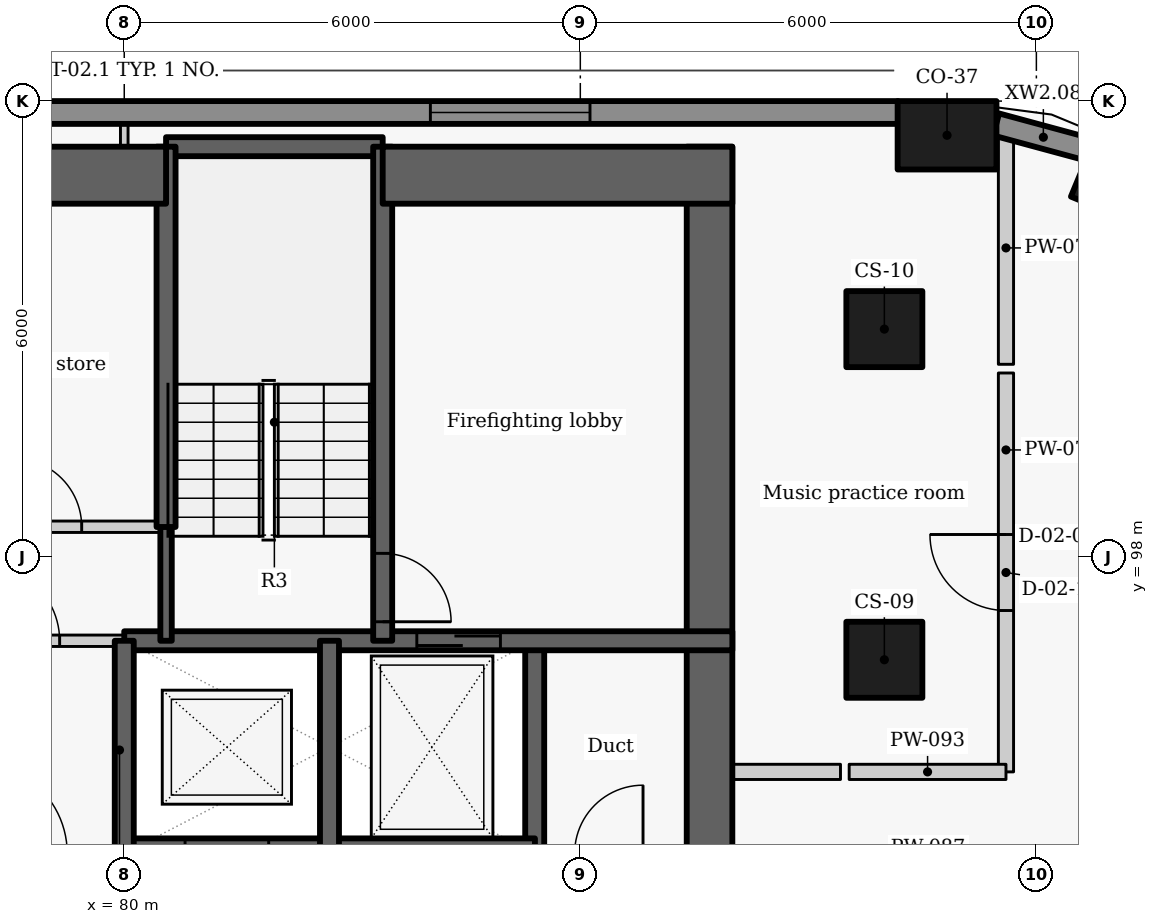
"""IFC4 building model, lengths in metres.
Left out: names, types, materials, properties, quantities, classifications, styles, units other than length and angle.
Written with IfcOpenShell. Run it as: python <this file> out.ifc"""

import sys

from ifc_helpers import new_model, si_unit, direction, frame, frame_2d, origin, origin_2d, place, context, subcontext, project, spatial, rectangle, extrude, element, fill, save


model = new_model("IFC4")
c1 = context("Model", 3, precision=1e-05, world=origin(), true_north=direction((0.0, 1.0)))
c2 = subcontext(c1, "Body", "Model", "MODEL_VIEW")
j1 = project(units=[si_unit("LENGTHUNIT", "METRE"), si_unit("PLANEANGLEUNIT", "RADIAN")], contexts=[c1])
p1 = place(None, origin())
s1 = spatial("IfcSite", under=j1, at=p1, CompositionType="ELEMENT")
p2 = place(p1, origin())
s2 = spatial("IfcBuilding", under=s1, at=p2, CompositionType="ELEMENT")
p3 = place(p2, frame((0.0, 0.0, 130.5)))
s3 = spatial("IfcBuildingStorey", under=s2, at=p3, CompositionType="ELEMENT", Elevation=130.5)
for number, where, z_axis, x_axis in (
    (1, (93.227, 102.91, 0.0), (0.0, 0.0, 1.0), (-0.924, 0.383, 0.0)),
    (2, (90.825, 103.55, 0.0), (0.0, 0.0, 1.0), (-1.0, 0.0, 0.0)),
):
    element("IfcColumn", number, at=place(p3, frame(where, z_axis=z_axis, x_axis=x_axis)), inside=s3, PredefinedType="COLUMN", context=c2, shape_type="SweptSolid", body=[
        extrude(rectangle(XDim=1.3, YDim=0.9, at=origin_2d()), origin(), (0.0, 0.0, 1.0), 3.3),
    ])
for number, where, z_axis, x_axis in (
    (3, (90.0, 96.65, 0.0), (0.0, 0.0, 1.0), (0.0, 1.0, 0.0)),
    (4, (90.0, 101.0, 0.0), (0.0, 0.0, 1.0), (0.0, 1.0, 0.0)),
):
    element("IfcColumn", number, at=place(p3, frame(where, z_axis=z_axis, x_axis=x_axis)), inside=s3, PredefinedType="COLUMN", context=c2, shape_type="SweptSolid", body=[
        extrude(rectangle(XDim=1.0, YDim=1.0, at=origin_2d()), origin(), (0.0, 0.0, 1.0), 3.3),
    ])
p4 = place(p3, frame((92.713, 103.356, 0.0), z_axis=(0.0, 0.0, 1.0), x_axis=(-0.965274225809, 0.26123872031, 0.0)))
e5 = element("IfcWall", 5, at=p4, inside=s3, PredefinedType="SOLIDWALL", context=c2, shape_type="SweptSolid", body=[
    extrude(rectangle(XDim=1.287, YDim=0.3, at=frame_2d((0.644, 0.0))), origin(), (0.0, 0.0, 1.0), 2.425),
])
p5 = place(p3, frame((90.179, 103.85, 0.0), z_axis=(0.0, 0.0, 1.0), x_axis=(-1.0, 0.0, 0.0)))
e6 = element("IfcWall", 6, at=p5, inside=s3, PredefinedType="SOLIDWALL", context=c2, shape_type="SweptSolid", body=[
    extrude(rectangle(XDim=20.391, YDim=0.3, at=frame_2d((10.196, 0.0))), origin(), (0.0, 0.0, 1.0), 2.425),
])
p6 = place(p5, frame((4.051, 0.0, 0.9)))
e7 = element("IfcOpeningElement", 7, at=p6, cuts=e6, PredefinedType="OPENING", context=c2, shape_type="SweptSolid", body=[
    extrude(rectangle(XDim=2.1, YDim=1.1, at=frame_2d((1.05, 0.55))), frame((0.0, 0.16, 0.0), z_axis=(0.0, -1.0, 0.0), x_axis=(1.0, 0.0, 0.0)), (0.0, 0.0, 1.0), 0.32),
])
p7 = place(p5, frame((14.212, 0.0, 0.9)))
e8 = element("IfcOpeningElement", 8, at=p7, cuts=e6, PredefinedType="OPENING", context=c2, shape_type="SweptSolid", body=[
    extrude(rectangle(XDim=2.1, YDim=1.1, at=frame_2d((1.05, 0.55))), frame((0.0, 0.16, 0.0), z_axis=(0.0, -1.0, 0.0), x_axis=(1.0, 0.0, 0.0)), (0.0, 0.0, 1.0), 0.32),
])
p8 = place(p3, frame((85.4, 94.1, -0.275), z_axis=(0.0, 0.0, 1.0), x_axis=(0.0, 1.0, 0.0)))
e9 = element("IfcWall", 9, at=p8, inside=s3, PredefinedType="SHEAR", context=c2, shape_type="SweptSolid", body=[
    extrude(rectangle(XDim=2.8, YDim=0.25, at=frame_2d((1.4, 0.0))), origin(), (0.0, 0.0, 1.0), 3.3),
])
p9 = place(p3, frame((87.7, 103.4, -0.275), z_axis=(0.0, 0.0, 1.0), x_axis=(0.0, -1.0, 0.0)))
e10 = element("IfcWall", 10, at=p9, inside=s3, PredefinedType="SHEAR", context=c2, shape_type="SweptSolid", body=[
    extrude(rectangle(XDim=15.6, YDim=0.6, at=frame_2d((7.8, 0.0))), origin(), (0.0, 0.0, 1.0), 3.3),
])
p10 = place(p9, frame((10.248, 0.0, 0.275)))
e11 = element("IfcOpeningElement", 11, at=p10, cuts=e10, PredefinedType="OPENING", context=c2, shape_type="SweptSolid", body=[
    extrude(rectangle(XDim=1.5, YDim=2.1, at=frame_2d((0.75, 1.05))), frame((0.0, 0.31, 0.0), z_axis=(0.0, -1.0, 0.0), x_axis=(1.0, 0.0, 0.0)), (0.0, 0.0, 1.0), 0.62),
])
p11 = place(p3, frame((79.997, 94.1, -0.275), z_axis=(0.0, 0.0, 1.0), x_axis=(1.0, 0.0, 0.0)))
e12 = element("IfcWall", 12, at=p11, inside=s3, PredefinedType="SHEAR", context=c2, shape_type="SweptSolid", body=[
    extrude(rectangle(XDim=5.406, YDim=0.4, at=frame_2d((2.703, 0.0))), origin(), (0.0, 0.0, 1.0), 3.3),
])
p12 = place(p11, frame((0.803, 0.0, 0.275)))
e13 = element("IfcOpeningElement", 13, at=p12, cuts=e12, PredefinedType="OPENING", context=c2, shape_type="SweptSolid", body=[
    extrude(rectangle(XDim=1.1, YDim=2.1, at=frame_2d((0.55, 1.05))), frame((0.0, 0.21, 0.0), z_axis=(0.0, -1.0, 0.0), x_axis=(1.0, 0.0, 0.0)), (0.0, 0.0, 1.0), 0.42),
])
p13 = place(p3, frame((80.0, 96.9, -0.275), z_axis=(0.0, 0.0, 1.0), x_axis=(1.0, 0.0, 0.0)))
e14 = element("IfcWall", 14, at=p13, inside=s3, PredefinedType="SHEAR", context=c2, shape_type="SweptSolid", body=[
    extrude(rectangle(XDim=8.0, YDim=0.25, at=frame_2d((4.0, 0.0))), origin(), (0.0, 0.0, 1.0), 3.3),
])
p14 = place(p13, frame((3.849, 0.0, 0.275)))
e15 = element("IfcOpeningElement", 15, at=p14, cuts=e14, PredefinedType="OPENING", context=c2, shape_type="SweptSolid", body=[
    extrude(rectangle(XDim=1.1, YDim=2.1, at=frame_2d((0.55, 1.05))), frame((0.0, 0.135, 0.0), z_axis=(0.0, -1.0, 0.0), x_axis=(1.0, 0.0, 0.0)), (0.0, 0.0, 1.0), 0.27),
])
p15 = place(p3, frame((80.0, 94.1, -0.275), z_axis=(0.0, 0.0, 1.0), x_axis=(0.0, 1.0, 0.0)))
e16 = element("IfcWall", 16, at=p15, inside=s3, PredefinedType="SHEAR", context=c2, shape_type="SweptSolid", body=[
    extrude(rectangle(XDim=2.8, YDim=0.25, at=frame_2d((1.4, 0.0))), origin(), (0.0, 0.0, 1.0), 3.3),
])
p16 = place(p3, frame((77.3, 96.9, 0.0), z_axis=(0.0, 0.0, 1.0), x_axis=(1.0, 0.0, 0.0)))
e17 = element("IfcWall", 17, at=p16, inside=s3, PredefinedType="PARTITIONING", context=c2, shape_type="SweptSolid", body=[
    extrude(rectangle(XDim=2.7, YDim=0.15, at=frame_2d((1.35, 0.0))), origin(), (0.0, 0.0, 1.0), 3.025),
])
p17 = place(p16, frame((0.85, 0.0, 0.0)))
e18 = element("IfcOpeningElement", 18, at=p17, cuts=e17, PredefinedType="OPENING", context=c2, shape_type="SweptSolid", body=[
    extrude(rectangle(XDim=1.0, YDim=2.1, at=frame_2d((0.5, 1.05))), frame((0.0, 0.085, 0.0), z_axis=(0.0, -1.0, 0.0), x_axis=(1.0, 0.0, 0.0)), (0.0, 0.0, 1.0), 0.17),
])
p18 = place(p3, frame((82.7, 94.1, -0.275), z_axis=(0.0, 0.0, 1.0), x_axis=(0.0, 1.0, 0.0)))
e19 = element("IfcWall", 19, at=p18, inside=s3, PredefinedType="SHEAR", context=c2, shape_type="SweptSolid", body=[
    extrude(rectangle(XDim=2.8, YDim=0.25, at=frame_2d((1.4, 0.0))), origin(), (0.0, 0.0, 1.0), 3.3),
])
p19 = place(p3, frame((80.55, 103.4, -0.275), z_axis=(0.0, 0.0, 1.0), x_axis=(1.0, 0.0, 0.0)))
e20 = element("IfcWall", 20, at=p19, inside=s3, PredefinedType="SHEAR", context=c2, shape_type="SweptSolid", body=[
    extrude(rectangle(XDim=2.85, YDim=0.25, at=frame_2d((1.425, 0.0))), origin(), (0.0, 0.0, 1.0), 3.3),
])
p20 = place(p3, frame((83.4, 103.4, -0.275), z_axis=(0.0, 0.0, 1.0), x_axis=(0.0, -1.0, 0.0)))
e21 = element("IfcWall", 21, at=p20, inside=s3, PredefinedType="SHEAR", context=c2, shape_type="SweptSolid", body=[
    extrude(rectangle(XDim=6.5, YDim=0.25, at=frame_2d((3.25, 0.0))), origin(), (0.0, 0.0, 1.0), 3.3),
])
p21 = place(p20, frame((5.35, 0.0, 0.275)))
e22 = element("IfcOpeningElement", 22, at=p21, cuts=e21, PredefinedType="OPENING", context=c2, shape_type="SweptSolid", body=[
    extrude(rectangle(XDim=0.9, YDim=2.1, at=frame_2d((0.45, 1.05))), frame((0.0, 0.135, 0.0), z_axis=(0.0, -1.0, 0.0), x_axis=(1.0, 0.0, 0.0)), (0.0, 0.0, 1.0), 0.27),
])
p22 = place(p3, frame((80.55, 96.9, -0.275), z_axis=(0.0, 0.0, 1.0), x_axis=(0.0, 1.0, 0.0)))
e23 = element("IfcWall", 23, at=p22, inside=s3, PredefinedType="SHEAR", context=c2, shape_type="SweptSolid", body=[
    extrude(rectangle(XDim=1.503, YDim=0.15, at=frame_2d((0.751, 0.0))), origin(), (0.0, 0.0, 1.0), 3.3),
])
p23 = place(p3, frame((80.55, 98.397, -0.275), z_axis=(0.0, 0.0, 1.0), x_axis=(0.0, 1.0, 0.0)))
e24 = element("IfcWall", 24, at=p23, inside=s3, PredefinedType="SHEAR", context=c2, shape_type="SweptSolid", body=[
    extrude(rectangle(XDim=5.003, YDim=0.25, at=frame_2d((2.501, 0.0))), origin(), (0.0, 0.0, 1.0), 3.3),
])
p24 = place(p3, frame((75.35, 103.025, -0.275), z_axis=(0.0, 0.0, 1.0), x_axis=(1.0, 0.0, 0.0)))
e25 = element("IfcWall", 25, at=p24, inside=s3, PredefinedType="SHEAR", context=c2, shape_type="SweptSolid", body=[
    extrude(rectangle(XDim=5.2, YDim=0.75, at=frame_2d((2.6, 0.0))), origin(), (0.0, 0.0, 1.0), 3.3),
])
p25 = place(p3, frame((83.4, 103.025, -0.275), z_axis=(0.0, 0.0, 1.0), x_axis=(1.0, 0.0, 0.0)))
e26 = element("IfcWall", 26, at=p25, inside=s3, PredefinedType="SHEAR", context=c2, shape_type="SweptSolid", body=[
    extrude(rectangle(XDim=4.6, YDim=0.75, at=frame_2d((2.3, 0.0))), origin(), (0.0, 0.0, 1.0), 3.3),
])
p26 = place(p3, frame((75.35, 98.4, 0.0), z_axis=(0.0, 0.0, 1.0), x_axis=(1.0, 0.0, 0.0)))
e27 = element("IfcWall", 27, at=p26, inside=s3, PredefinedType="PARTITIONING", context=c2, shape_type="SweptSolid", body=[
    extrude(rectangle(XDim=5.2, YDim=0.15, at=frame_2d((2.6, 0.0))), origin(), (0.0, 0.0, 1.0), 3.025),
])
p27 = place(p26, frame((0.59, 0.0, 0.0)))
e28 = element("IfcOpeningElement", 28, at=p27, cuts=e27, PredefinedType="OPENING", context=c2, shape_type="SweptSolid", body=[
    extrude(rectangle(XDim=0.9, YDim=2.1, at=frame_2d((0.45, 1.05))), frame((0.0, 0.085, 0.0), z_axis=(0.0, -1.0, 0.0), x_axis=(1.0, 0.0, 0.0)), (0.0, 0.0, 1.0), 0.17),
])
p28 = place(p26, frame((3.19, 0.0, 0.0)))
e29 = element("IfcOpeningElement", 29, at=p28, cuts=e27, PredefinedType="OPENING", context=c2, shape_type="SweptSolid", body=[
    extrude(rectangle(XDim=0.9, YDim=2.1, at=frame_2d((0.45, 1.05))), frame((0.0, 0.085, 0.0), z_axis=(0.0, -1.0, 0.0), x_axis=(1.0, 0.0, 0.0)), (0.0, 0.0, 1.0), 0.17),
])
p29 = place(p3, frame((91.6, 95.175, 0.0), z_axis=(0.0, 0.0, 1.0), x_axis=(0.0, 1.0, 0.0)))
e30 = element("IfcWall", 30, at=p29, inside=s3, PredefinedType="PARTITIONING", context=c2, shape_type="SweptSolid", body=[
    extrude(rectangle(XDim=5.248, YDim=0.2, at=frame_2d((2.624, 0.0))), origin(), (0.0, 0.0, 1.0), 3.025),
])
p30 = place(p29, frame((2.123, 0.0, 0.0)))
e31 = element("IfcOpeningElement", 31, at=p30, cuts=e30, PredefinedType="OPENING", context=c2, shape_type="SweptSolid", body=[
    extrude(rectangle(XDim=1.0, YDim=2.1, at=frame_2d((0.5, 1.05))), frame((0.0, 0.11, 0.0), z_axis=(0.0, -1.0, 0.0), x_axis=(1.0, 0.0, 0.0)), (0.0, 0.0, 1.0), 0.22),
])
p31 = place(p3, frame((91.6, 100.537, 0.0), z_axis=(0.0, 0.0, 1.0), x_axis=(0.0, 1.0, 0.0)))
e32 = element("IfcWall", 32, at=p31, inside=s3, PredefinedType="PARTITIONING", context=c2, shape_type="SweptSolid", body=[
    extrude(rectangle(XDim=3.062, YDim=0.2, at=frame_2d((1.531, 0.0))), origin(), (0.0, 0.0, 1.0), 2.405),
])
p32 = place(p3, frame((88.0, 95.175, 0.0), z_axis=(0.0, 0.0, 1.0), x_axis=(1.0, 0.0, 0.0)))
e33 = element("IfcWall", 33, at=p32, inside=s3, PredefinedType="PARTITIONING", context=c2, shape_type="SweptSolid", body=[
    extrude(rectangle(XDim=1.423, YDim=0.2, at=frame_2d((0.711, 0.0))), origin(), (0.0, 0.0, 1.0), 3.025),
])
p33 = place(p3, frame((89.537, 95.175, 0.0), z_axis=(0.0, 0.0, 1.0), x_axis=(1.0, 0.0, 0.0)))
e34 = element("IfcWall", 34, at=p33, inside=s3, PredefinedType="PARTITIONING", context=c2, shape_type="SweptSolid", body=[
    extrude(rectangle(XDim=2.063, YDim=0.2, at=frame_2d((1.031, 0.0))), origin(), (0.0, 0.0, 1.0), 2.505),
])
p34 = place(p3, frame((80.0, 103.4, 0.0), z_axis=(0.0, 0.0, 1.0), x_axis=(0.0, 1.0, 0.0)))
e35 = element("IfcWall", 35, at=p34, inside=s3, PredefinedType="PARTITIONING", context=c2, shape_type="SweptSolid", body=[
    extrude(rectangle(XDim=0.3, YDim=0.1, at=frame_2d((0.15, 0.0))), origin(), (0.0, 0.0, 1.0), 3.025),
])
p35 = place(p6, origin())
e36 = element("IfcWindow", 36, at=p35, inside=s3, PartitioningType="SINGLE_PANEL", PredefinedType="WINDOW", context=c2, shape_type="SweptSolid", body=[
    extrude(rectangle(XDim=2.1, YDim=1.1, at=frame_2d((1.05, 0.55))), frame((0.0, 0.03, 0.0), z_axis=(0.0, -1.0, 0.0), x_axis=(1.0, 0.0, 0.0)), (0.0, 0.0, 1.0), 0.06),
])
fill(e7, e36)
p36 = place(p14, origin())
e37 = element("IfcDoor", 37, at=p36, inside=s3, OperationType="SLIDING_TO_LEFT", PredefinedType="DOOR", context=c2, shape_type="SweptSolid", body=[
    extrude(rectangle(XDim=1.1, YDim=2.1, at=frame_2d((0.55, 1.05))), frame((0.0, 0.025, 0.0), z_axis=(0.0, -1.0, 0.0), x_axis=(1.0, 0.0, 0.0)), (0.0, 0.0, 1.0), 0.05),
])
fill(e15, e37)
p37 = place(p17, origin())
e38 = element("IfcDoor", 38, at=p37, inside=s3, OperationType="SINGLE_SWING_LEFT", PredefinedType="DOOR", context=c2, shape_type="SweptSolid", body=[
    extrude(rectangle(XDim=1.0, YDim=2.1, at=frame_2d((0.5, 1.05))), frame((0.0, 0.025, 0.0), z_axis=(0.0, -1.0, 0.0), x_axis=(1.0, 0.0, 0.0)), (0.0, 0.0, 1.0), 0.05),
])
fill(e18, e38)
p38 = place(p28, origin())
e39 = element("IfcDoor", 39, at=p38, inside=s3, OperationType="SINGLE_SWING_LEFT", PredefinedType="DOOR", context=c2, shape_type="SweptSolid", body=[
    extrude(rectangle(XDim=0.9, YDim=2.1, at=frame_2d((0.45, 1.05))), frame((0.0, 0.025, 0.0), z_axis=(0.0, -1.0, 0.0), x_axis=(1.0, 0.0, 0.0)), (0.0, 0.0, 1.0), 0.05),
])
fill(e29, e39)
p39 = place(p21, origin())
e40 = element("IfcDoor", 40, at=p39, inside=s3, OperationType="SINGLE_SWING_RIGHT", PredefinedType="DOOR", context=c2, shape_type="SweptSolid", body=[
    extrude(rectangle(XDim=0.9, YDim=2.1, at=frame_2d((0.45, 1.05))), frame((0.0, 0.025, 0.0), z_axis=(0.0, -1.0, 0.0), x_axis=(1.0, 0.0, 0.0)), (0.0, 0.0, 1.0), 0.05),
])
fill(e22, e40)
p40 = place(p30, origin())
e41 = element("IfcDoor", 41, at=p40, inside=s3, OperationType="SINGLE_SWING_RIGHT", PredefinedType="DOOR", context=c2, shape_type="SweptSolid", body=[
    extrude(rectangle(XDim=1.0, YDim=2.1, at=frame_2d((0.5, 1.05))), frame((0.0, 0.025, 0.0), z_axis=(0.0, -1.0, 0.0), x_axis=(1.0, 0.0, 0.0)), (0.0, 0.0, 1.0), 0.05),
])
fill(e31, e41)
save(model, sys.argv[1])
